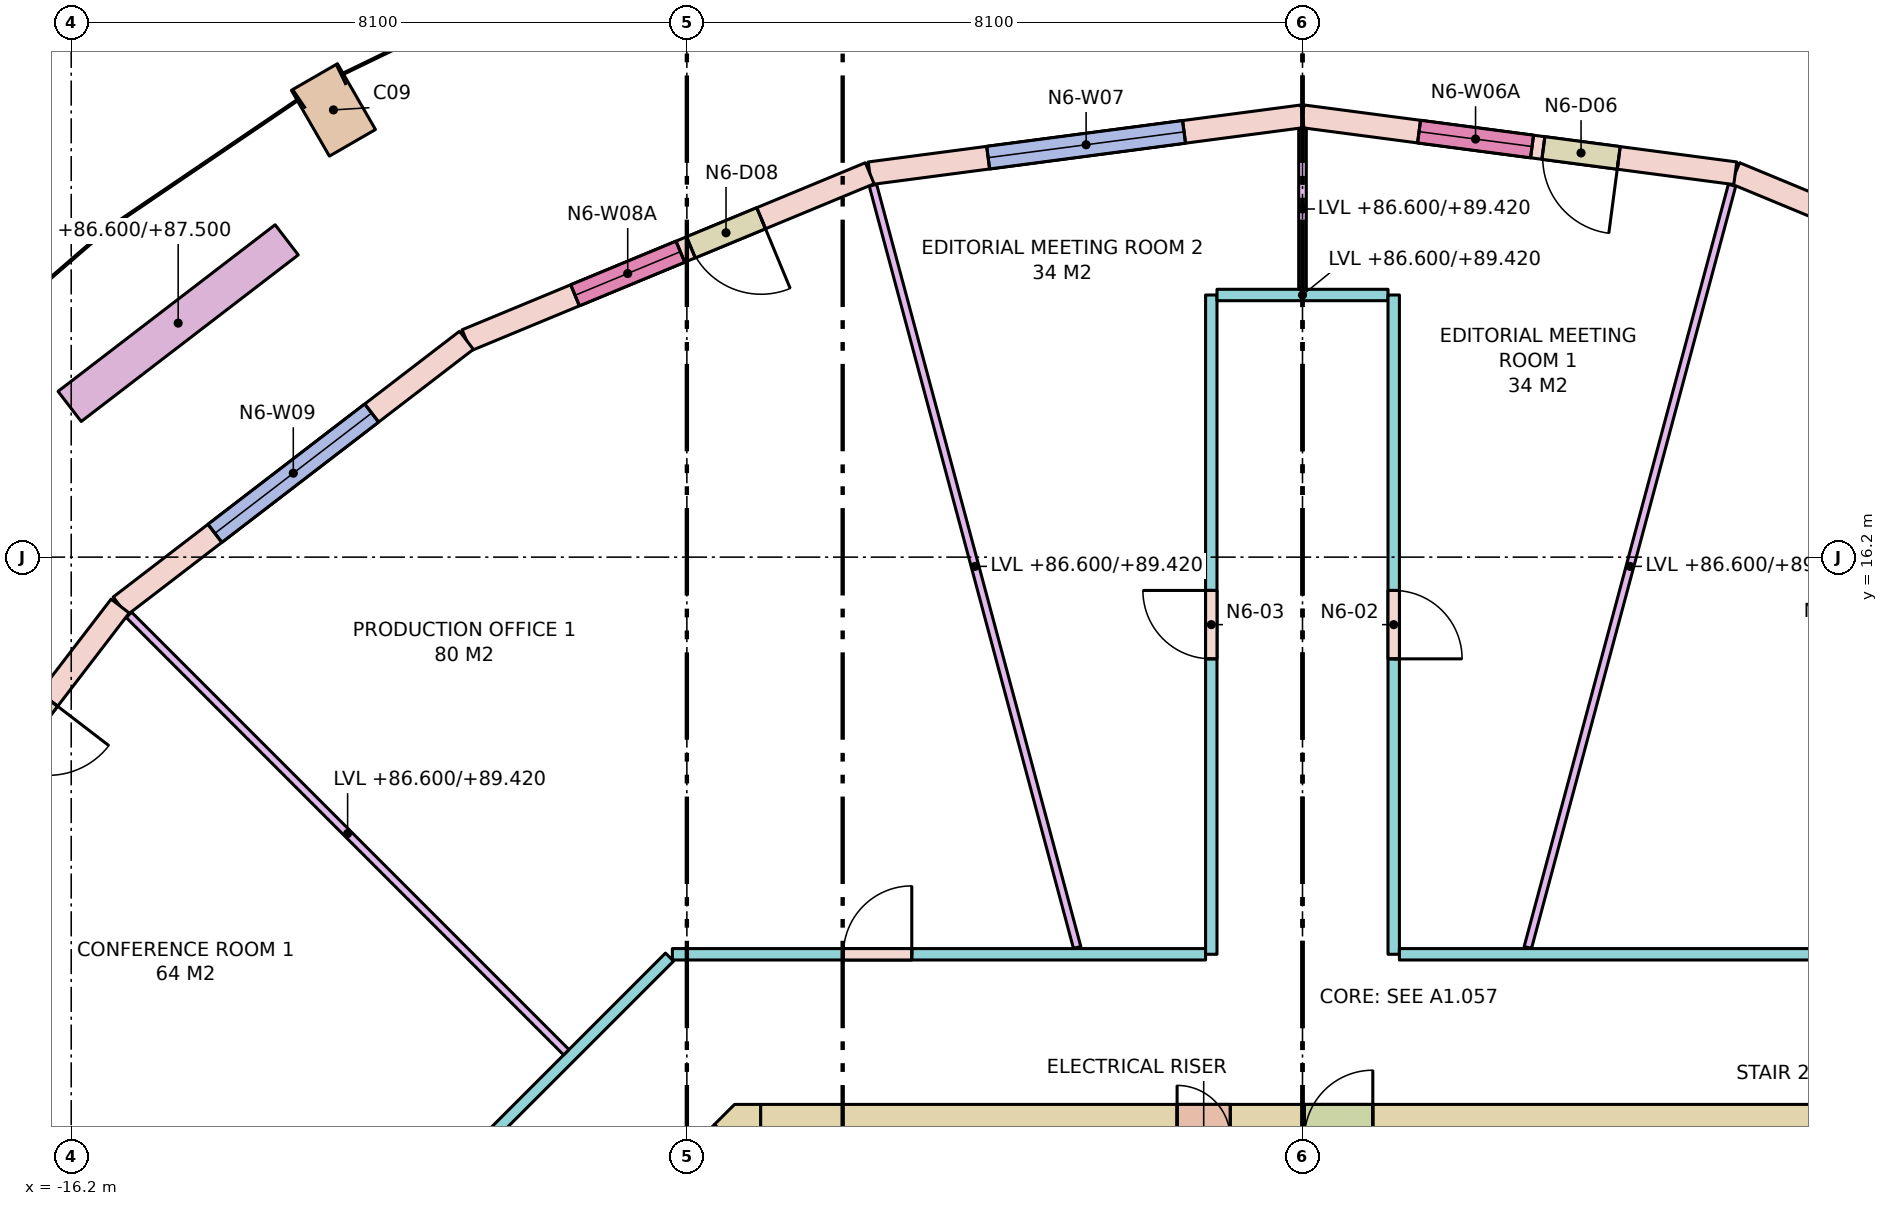
"""IFC4 building model, lengths in metres.
Left out: names, types, materials, properties, quantities, classifications, styles, units other than length and angle.
Written with IfcOpenShell. Run it as: python <this file> out.ifc"""

import sys

from ifc_helpers import new_model, si_unit, direction, frame, frame_2d, origin, origin_2d, place, context, subcontext, project, spatial, polyline, rectangle, outline, extrude, element, fill, save


model = new_model("IFC4")
c1 = context("Model", 3, precision=1e-05, world=origin(), true_north=direction((0.0, 1.0)))
c2 = subcontext(c1, "Body", "Model", "MODEL_VIEW")
j1 = project(units=[si_unit("LENGTHUNIT", "METRE"), si_unit("PLANEANGLEUNIT", "RADIAN")], contexts=[c1])
p1 = place(None, origin())
s1 = spatial("IfcSite", under=j1, at=p1, CompositionType="ELEMENT")
p2 = place(p1, origin())
s2 = spatial("IfcBuilding", under=s1, at=p2, CompositionType="ELEMENT")
p3 = place(p2, frame((0.0, 0.0, 86.6)))
s3 = spatial("IfcBuildingStorey", under=s2, at=p3, CompositionType="ELEMENT", Elevation=86.6)
p4 = place(p3, frame((-12.75, 22.084, 0.0), z_axis=(0.0, 0.0, 1.0), x_axis=(-0.866025403784, -0.5, 0.0)))
e1 = element("IfcColumn", 1, at=p4, inside=s3, PredefinedType="COLUMN", context=c2, shape_type="SweptSolid", body=[
    extrude(rectangle(XDim=0.7, YDim=1.0, at=origin_2d()), origin(), (0.0, 0.0, 1.0), 4.0),
])
p5 = place(p3, frame((-7.13, 8.55, -0.28), z_axis=(0.0, 0.0, 1.0), x_axis=(1.0, 0.0, 0.0)))
e2 = element("IfcWall", 2, at=p5, inside=s3, PredefinedType="SHEAR", context=c2, shape_type="SweptSolid", body=[
    extrude(rectangle(XDim=14.26, YDim=0.9, at=frame_2d((7.13, 0.0))), origin(), (0.0, 0.0, 1.0), 4.0),
])
p6 = place(p5, frame((5.48, 0.0, 0.28)))
e3 = element("IfcOpeningElement", 3, at=p6, cuts=e2, PredefinedType="OPENING", context=c2, shape_type="SweptSolid", body=[
    extrude(rectangle(XDim=0.7, YDim=2.1, at=frame_2d((0.35, 1.05))), frame((0.0, 0.46, 0.0), z_axis=(0.0, -1.0, 0.0), x_axis=(1.0, 0.0, 0.0)), (0.0, 0.0, 1.0), 0.92),
])
p7 = place(p5, frame((7.155, 0.0, 0.28)))
e4 = element("IfcOpeningElement", 4, at=p7, cuts=e2, PredefinedType="OPENING", context=c2, shape_type="SweptSolid", body=[
    extrude(rectangle(XDim=0.9, YDim=2.1, at=frame_2d((0.45, 1.05))), frame((0.0, 0.46, 0.0), z_axis=(0.0, -1.0, 0.0), x_axis=(1.0, 0.0, 0.0)), (0.0, 0.0, 1.0), 0.92),
])
p8 = place(p3, frame((-10.418, 5.418, -0.28), z_axis=(0.0, 0.0, 1.0), x_axis=(0.707106781187, 0.707106781187, 0.0)))
e5 = element("IfcWall", 5, at=p8, inside=s3, PredefinedType="SHEAR", context=c2, shape_type="SweptSolid", body=[
    extrude(rectangle(XDim=4.243, YDim=0.9, at=frame_2d((2.121, 0.0))), origin(), (0.0, 0.0, 1.0), 4.0),
])
p9 = place(p8, frame((0.65, 0.0, 0.28)))
e6 = element("IfcOpeningElement", 6, at=p9, cuts=e5, PredefinedType="OPENING", context=c2, shape_type="SweptSolid", body=[
    extrude(rectangle(XDim=1.2, YDim=2.1, at=frame_2d((0.6, 1.05))), frame((0.0, 0.46, 0.0), z_axis=(0.0, -1.0, 0.0), x_axis=(1.0, 0.0, 0.0)), (0.0, 0.0, 1.0), 0.92),
])
p10 = place(p3, frame((0.0, 0.0, -0.28)))
e7 = element("IfcWall", 7, at=p10, inside=s3, PredefinedType="SHEAR", context=c2, shape_type="SweptSolid", body=[
    extrude(outline(polyline([(-7.473, 9.0), (-7.13, 9.0), (-7.13, 8.13), (-7.736, 8.736), (-7.473, 9.0)])), origin(), (0.0, 0.0, 1.0), 4.0),
])
p11 = place(p3, frame((11.0, 19.052, 0.0), z_axis=(0.0, 0.0, 1.0), x_axis=(-0.923866055759, 0.382715966503, 0.0)))
e8 = element("IfcWall", 8, at=p11, inside=s3, PredefinedType="STANDARD", context=c2, shape_type="SweptSolid", body=[
    extrude(rectangle(XDim=5.743, YDim=0.3, at=frame_2d((2.872, 0.0))), origin(), (0.0, 0.0, 1.0), 3.72),
])
p12 = place(p11, frame((1.572, 0.0, 0.8)))
e9 = element("IfcOpeningElement", 9, at=p12, cuts=e8, PredefinedType="OPENING", context=c2, shape_type="SweptSolid", body=[
    extrude(rectangle(XDim=2.6, YDim=2.7, at=frame_2d((1.3, 1.35))), frame((0.0, 0.16, 0.0), z_axis=(0.0, -1.0, 0.0), x_axis=(1.0, 0.0, 0.0)), (0.0, 0.0, 1.0), 0.32),
])
p13 = place(p3, frame((5.694, 21.25, 0.0), z_axis=(0.0, 0.0, 1.0), x_axis=(-0.991447783331, 0.130503995834, 0.0)))
e10 = element("IfcWall", 10, at=p13, inside=s3, PredefinedType="STANDARD", context=c2, shape_type="SweptSolid", body=[
    extrude(rectangle(XDim=5.743, YDim=0.3, at=frame_2d((2.872, 0.0))), origin(), (0.0, 0.0, 1.0), 3.72),
])
p14 = place(p13, frame((1.547, 0.0, 0.0)))
e11 = element("IfcOpeningElement", 11, at=p14, cuts=e10, PredefinedType="OPENING", context=c2, shape_type="SweptSolid", body=[
    extrude(rectangle(XDim=1.0, YDim=2.4, at=frame_2d((0.5, 1.2))), frame((0.0, 0.16, 0.0), z_axis=(0.0, -1.0, 0.0), x_axis=(1.0, 0.0, 0.0)), (0.0, 0.0, 1.0), 0.32),
])
p15 = place(p13, frame((2.697, 0.0, 0.8)))
e12 = element("IfcOpeningElement", 12, at=p15, cuts=e10, PredefinedType="OPENING", context=c2, shape_type="SweptSolid", body=[
    extrude(rectangle(XDim=1.5, YDim=2.7, at=frame_2d((0.75, 1.35))), frame((0.0, 0.16, 0.0), z_axis=(0.0, -1.0, 0.0), x_axis=(1.0, 0.0, 0.0)), (0.0, 0.0, 1.0), 0.32),
])
p16 = place(p3, frame((0.0, 22.0, 0.0), z_axis=(0.0, 0.0, 1.0), x_axis=(-0.991447783331, -0.130503995834, 0.0)))
e13 = element("IfcWall", 13, at=p16, inside=s3, PredefinedType="STANDARD", context=c2, shape_type="SweptSolid", body=[
    extrude(rectangle(XDim=5.743, YDim=0.3, at=frame_2d((2.872, 0.0))), origin(), (0.0, 0.0, 1.0), 3.72),
])
p17 = place(p16, frame((1.572, 0.0, 0.8)))
e14 = element("IfcOpeningElement", 14, at=p17, cuts=e13, PredefinedType="OPENING", context=c2, shape_type="SweptSolid", body=[
    extrude(rectangle(XDim=2.6, YDim=2.7, at=frame_2d((1.3, 1.35))), frame((0.0, 0.16, 0.0), z_axis=(0.0, -1.0, 0.0), x_axis=(1.0, 0.0, 0.0)), (0.0, 0.0, 1.0), 0.32),
])
p18 = place(p3, frame((-5.694, 21.25, 0.0), z_axis=(0.0, 0.0, 1.0), x_axis=(-0.923866055759, -0.382715966503, 0.0)))
e15 = element("IfcWall", 15, at=p18, inside=s3, PredefinedType="STANDARD", context=c2, shape_type="SweptSolid", body=[
    extrude(rectangle(XDim=5.743, YDim=0.3, at=frame_2d((2.872, 0.0))), origin(), (0.0, 0.0, 1.0), 3.72),
])
p19 = place(p18, frame((1.547, 0.0, 0.0)))
e16 = element("IfcOpeningElement", 16, at=p19, cuts=e15, PredefinedType="OPENING", context=c2, shape_type="SweptSolid", body=[
    extrude(rectangle(XDim=1.0, YDim=2.4, at=frame_2d((0.5, 1.2))), frame((0.0, 0.16, 0.0), z_axis=(0.0, -1.0, 0.0), x_axis=(1.0, 0.0, 0.0)), (0.0, 0.0, 1.0), 0.32),
])
p20 = place(p18, frame((2.697, 0.0, 0.8)))
e17 = element("IfcOpeningElement", 17, at=p20, cuts=e15, PredefinedType="OPENING", context=c2, shape_type="SweptSolid", body=[
    extrude(rectangle(XDim=1.5, YDim=2.7, at=frame_2d((0.75, 1.35))), frame((0.0, 0.16, 0.0), z_axis=(0.0, -1.0, 0.0), x_axis=(1.0, 0.0, 0.0)), (0.0, 0.0, 1.0), 0.32),
])
p21 = place(p3, frame((-11.0, 19.052, 0.0), z_axis=(0.0, 0.0, 1.0), x_axis=(-0.793366142647, -0.608744744291, 0.0)))
e18 = element("IfcWall", 18, at=p21, inside=s3, PredefinedType="STANDARD", context=c2, shape_type="SweptSolid", body=[
    extrude(rectangle(XDim=5.743, YDim=0.3, at=frame_2d((2.872, 0.0))), origin(), (0.0, 0.0, 1.0), 3.72),
])
p22 = place(p21, frame((1.572, 0.0, 0.8)))
e19 = element("IfcOpeningElement", 19, at=p22, cuts=e18, PredefinedType="OPENING", context=c2, shape_type="SweptSolid", body=[
    extrude(rectangle(XDim=2.6, YDim=2.7, at=frame_2d((1.3, 1.35))), frame((0.0, 0.16, 0.0), z_axis=(0.0, -1.0, 0.0), x_axis=(1.0, 0.0, 0.0)), (0.0, 0.0, 1.0), 0.32),
])
p23 = place(p3, frame((-15.556, 15.556, 0.0), z_axis=(0.0, 0.0, 1.0), x_axis=(-0.608744744291, -0.793366142647, 0.0)))
e20 = element("IfcWall", 20, at=p23, inside=s3, PredefinedType="STANDARD", context=c2, shape_type="SweptSolid", body=[
    extrude(rectangle(XDim=5.743, YDim=0.3, at=frame_2d((2.872, 0.0))), origin(), (0.0, 0.0, 1.0), 3.72),
])
p24 = place(p23, frame((1.547, 0.0, 0.0)))
e21 = element("IfcOpeningElement", 21, at=p24, cuts=e20, PredefinedType="OPENING", context=c2, shape_type="SweptSolid", body=[
    extrude(rectangle(XDim=1.0, YDim=2.4, at=frame_2d((0.5, 1.2))), frame((0.0, 0.16, 0.0), z_axis=(0.0, -1.0, 0.0), x_axis=(1.0, 0.0, 0.0)), (0.0, 0.0, 1.0), 0.32),
])
p25 = place(p23, frame((2.697, 0.0, 0.8)))
e22 = element("IfcOpeningElement", 22, at=p25, cuts=e20, PredefinedType="OPENING", context=c2, shape_type="SweptSolid", body=[
    extrude(rectangle(XDim=1.5, YDim=2.7, at=frame_2d((0.75, 1.35))), frame((0.0, 0.16, 0.0), z_axis=(0.0, -1.0, 0.0), x_axis=(1.0, 0.0, 0.0)), (0.0, 0.0, 1.0), 0.32),
])
p26 = place(p3, frame((-13.365, 20.374, 0.0), z_axis=(0.0, 0.0, 1.0), x_axis=(-0.793326845617, -0.608795955984, 0.0)))
e23 = element("IfcWall", 23, at=p26, inside=s3, PredefinedType="PARAPET", context=c2, shape_type="SweptSolid", body=[
    extrude(rectangle(XDim=3.6, YDim=0.5, at=frame_2d((1.8, 0.0))), origin(), (0.0, 0.0, 1.0), 0.9),
])
p27 = place(p3, frame((-12.975, 6.291, 0.0), z_axis=(0.0, 0.0, 1.0), x_axis=(0.707125355289, 0.707088206597, 0.0)))
e24 = element("IfcWall", 24, at=p27, inside=s3, PredefinedType="PARTITIONING", context=c2, shape_type="SweptSolid", body=[
    extrude(rectangle(XDim=6.572, YDim=0.15, at=frame_2d((3.286, 0.0))), origin(), (0.0, 0.0, 1.0), 2.82),
])
p28 = place(p3, frame((-8.291, 10.975, 0.0), z_axis=(0.0, 0.0, 1.0), x_axis=(1.0, 0.0, 0.0)))
e25 = element("IfcWall", 25, at=p28, inside=s3, PredefinedType="PARTITIONING", context=c2, shape_type="SweptSolid", body=[
    extrude(rectangle(XDim=7.016, YDim=0.15, at=frame_2d((3.508, 0.0))), origin(), (0.0, 0.0, 1.0), 2.82),
])
p29 = place(p28, frame((2.25, 0.0, 0.0)))
e26 = element("IfcOpeningElement", 26, at=p29, cuts=e25, PredefinedType="OPENING", context=c2, shape_type="SweptSolid", body=[
    extrude(rectangle(XDim=0.9, YDim=2.1, at=frame_2d((0.45, 1.05))), frame((0.0, 0.085, 0.0), z_axis=(0.0, -1.0, 0.0), x_axis=(1.0, 0.0, 0.0)), (0.0, 0.0, 1.0), 0.17),
])
p30 = place(p3, frame((-1.2, 10.975, 0.0), z_axis=(0.0, 0.0, 1.0), x_axis=(0.0, 1.0, 0.0)))
e27 = element("IfcWall", 27, at=p30, inside=s3, PredefinedType="PARTITIONING", context=c2, shape_type="SweptSolid", body=[
    extrude(rectangle(XDim=8.674, YDim=0.15, at=frame_2d((4.337, 0.0))), origin(), (0.0, 0.0, 1.0), 3.72),
])
p31 = place(p30, frame((3.887, 0.0, 0.0)))
e28 = element("IfcOpeningElement", 28, at=p31, cuts=e27, PredefinedType="OPENING", context=c2, shape_type="SweptSolid", body=[
    extrude(rectangle(XDim=0.9, YDim=2.1, at=frame_2d((0.45, 1.05))), frame((0.0, 0.085, 0.0), z_axis=(0.0, -1.0, 0.0), x_axis=(1.0, 0.0, 0.0)), (0.0, 0.0, 1.0), 0.17),
])
p32 = place(p3, frame((-1.125, 19.649, 0.0), z_axis=(0.0, 0.0, 1.0), x_axis=(1.0, 0.0, 0.0)))
e29 = element("IfcWall", 29, at=p32, inside=s3, PredefinedType="PARTITIONING", context=c2, shape_type="SweptSolid", body=[
    extrude(rectangle(XDim=2.25, YDim=0.15, at=frame_2d((1.125, 0.0))), origin(), (0.0, 0.0, 1.0), 2.82),
])
p33 = place(p3, frame((1.2, 19.649, 0.0), z_axis=(0.0, 0.0, 1.0), x_axis=(0.0, -1.0, 0.0)))
e30 = element("IfcWall", 30, at=p33, inside=s3, PredefinedType="PARTITIONING", context=c2, shape_type="SweptSolid", body=[
    extrude(rectangle(XDim=8.674, YDim=0.15, at=frame_2d((4.337, 0.0))), origin(), (0.0, 0.0, 1.0), 3.72),
])
p34 = place(p33, frame((3.887, 0.0, 0.0)))
e31 = element("IfcOpeningElement", 31, at=p34, cuts=e30, PredefinedType="OPENING", context=c2, shape_type="SweptSolid", body=[
    extrude(rectangle(XDim=0.9, YDim=2.1, at=frame_2d((0.45, 1.05))), frame((0.0, 0.085, 0.0), z_axis=(0.0, -1.0, 0.0), x_axis=(1.0, 0.0, 0.0)), (0.0, 0.0, 1.0), 0.17),
])
p35 = place(p3, frame((1.275, 10.975, 0.0), z_axis=(0.0, 0.0, 1.0), x_axis=(1.0, 0.0, 0.0)))
e32 = element("IfcWall", 32, at=p35, inside=s3, PredefinedType="PARTITIONING", context=c2, shape_type="SweptSolid", body=[
    extrude(rectangle(XDim=7.016, YDim=0.15, at=frame_2d((3.508, 0.0))), origin(), (0.0, 0.0, 1.0), 2.82),
])
p36 = place(p3, frame((2.965, 11.064, 0.0), z_axis=(0.0, 0.0, 1.0), x_axis=(0.258834819477, 0.96592159942, 0.0)))
e33 = element("IfcWall", 33, at=p36, inside=s3, PredefinedType="PARTITIONING", context=c2, shape_type="SweptSolid", body=[
    extrude(rectangle(XDim=10.382, YDim=0.1, at=frame_2d((5.191, 0.0))), origin(), (0.0, 0.0, 1.0), 2.82),
])
p37 = place(p3, frame((0.0, 19.724, 0.0), z_axis=(0.0, 0.0, 1.0), x_axis=(0.0, 1.0, 0.0)))
e34 = element("IfcWall", 34, at=p37, inside=s3, PredefinedType="PARTITIONING", context=c2, shape_type="SweptSolid", body=[
    extrude(rectangle(XDim=2.113, YDim=0.1, at=frame_2d((1.057, 0.0))), origin(), (0.0, 0.0, 1.0), 2.82),
])
p38 = place(p3, frame((-2.965, 11.064, 0.0), z_axis=(0.0, 0.0, 1.0), x_axis=(-0.258834819477, 0.96592159942, 0.0)))
e35 = element("IfcWall", 35, at=p38, inside=s3, PredefinedType="PARTITIONING", context=c2, shape_type="SweptSolid", body=[
    extrude(rectangle(XDim=10.382, YDim=0.1, at=frame_2d((5.191, 0.0))), origin(), (0.0, 0.0, 1.0), 2.82),
])
p39 = place(p3, frame((-9.686, 9.686, 0.0), z_axis=(0.0, 0.0, 1.0), x_axis=(-0.707106781187, 0.707106781187, 0.0)))
e36 = element("IfcWall", 36, at=p39, inside=s3, PredefinedType="PARTITIONING", context=c2, shape_type="SweptSolid", body=[
    extrude(rectangle(XDim=8.139, YDim=0.1, at=frame_2d((4.069, 0.0))), origin(), (0.0, 0.0, 1.0), 2.82),
])
p40 = place(p14, origin())
e37 = element("IfcDoor", 37, at=p40, inside=s3, OperationType="SINGLE_SWING_LEFT", PredefinedType="DOOR", context=c2, shape_type="SweptSolid", body=[
    extrude(rectangle(XDim=1.0, YDim=2.4, at=frame_2d((0.5, 1.2))), frame((0.0, 0.025, 0.0), z_axis=(0.0, -1.0, 0.0), x_axis=(1.0, 0.0, 0.0)), (0.0, 0.0, 1.0), 0.05),
])
fill(e11, e37)
p41 = place(p15, origin())
e38 = element("IfcWindow", 38, at=p41, inside=s3, PartitioningType="SINGLE_PANEL", PredefinedType="WINDOW", context=c2, shape_type="SweptSolid", body=[
    extrude(rectangle(XDim=1.5, YDim=2.7, at=frame_2d((0.75, 1.35))), frame((0.0, 0.03, 0.0), z_axis=(0.0, -1.0, 0.0), x_axis=(1.0, 0.0, 0.0)), (0.0, 0.0, 1.0), 0.06),
])
fill(e12, e38)
p42 = place(p17, origin())
e39 = element("IfcWindow", 39, at=p42, inside=s3, PartitioningType="SINGLE_PANEL", PredefinedType="WINDOW", context=c2, shape_type="SweptSolid", body=[
    extrude(rectangle(XDim=2.6, YDim=2.7, at=frame_2d((1.3, 1.35))), frame((0.0, 0.03, 0.0), z_axis=(0.0, -1.0, 0.0), x_axis=(1.0, 0.0, 0.0)), (0.0, 0.0, 1.0), 0.06),
])
fill(e14, e39)
p43 = place(p19, origin())
e40 = element("IfcDoor", 40, at=p43, inside=s3, OperationType="SINGLE_SWING_LEFT", PredefinedType="DOOR", context=c2, shape_type="SweptSolid", body=[
    extrude(rectangle(XDim=1.0, YDim=2.4, at=frame_2d((0.5, 1.2))), frame((0.0, 0.025, 0.0), z_axis=(0.0, -1.0, 0.0), x_axis=(1.0, 0.0, 0.0)), (0.0, 0.0, 1.0), 0.05),
])
fill(e16, e40)
p44 = place(p20, origin())
e41 = element("IfcWindow", 41, at=p44, inside=s3, PartitioningType="SINGLE_PANEL", PredefinedType="WINDOW", context=c2, shape_type="SweptSolid", body=[
    extrude(rectangle(XDim=1.5, YDim=2.7, at=frame_2d((0.75, 1.35))), frame((0.0, 0.03, 0.0), z_axis=(0.0, -1.0, 0.0), x_axis=(1.0, 0.0, 0.0)), (0.0, 0.0, 1.0), 0.06),
])
fill(e17, e41)
p45 = place(p22, origin())
e42 = element("IfcWindow", 42, at=p45, inside=s3, PartitioningType="SINGLE_PANEL", PredefinedType="WINDOW", context=c2, shape_type="SweptSolid", body=[
    extrude(rectangle(XDim=2.6, YDim=2.7, at=frame_2d((1.3, 1.35))), frame((0.0, 0.03, 0.0), z_axis=(0.0, -1.0, 0.0), x_axis=(1.0, 0.0, 0.0)), (0.0, 0.0, 1.0), 0.06),
])
fill(e19, e42)
p46 = place(p34, origin())
e43 = element("IfcDoor", 43, at=p46, inside=s3, OperationType="SINGLE_SWING_RIGHT", PredefinedType="DOOR", context=c2, shape_type="SweptSolid", body=[
    extrude(rectangle(XDim=0.9, YDim=2.1, at=frame_2d((0.45, 1.05))), frame((0.0, 0.025, 0.0), z_axis=(0.0, -1.0, 0.0), x_axis=(1.0, 0.0, 0.0)), (0.0, 0.0, 1.0), 0.05),
])
fill(e31, e43)
p47 = place(p31, origin())
e44 = element("IfcDoor", 44, at=p47, inside=s3, OperationType="SINGLE_SWING_RIGHT", PredefinedType="DOOR", context=c2, shape_type="SweptSolid", body=[
    extrude(rectangle(XDim=0.9, YDim=2.1, at=frame_2d((0.45, 1.05))), frame((0.0, 0.025, 0.0), z_axis=(0.0, -1.0, 0.0), x_axis=(1.0, 0.0, 0.0)), (0.0, 0.0, 1.0), 0.05),
])
fill(e28, e44)
p48 = place(p29, origin())
e45 = element("IfcDoor", 45, at=p48, inside=s3, OperationType="SINGLE_SWING_RIGHT", PredefinedType="DOOR", context=c2, shape_type="SweptSolid", body=[
    extrude(rectangle(XDim=0.9, YDim=2.1, at=frame_2d((0.45, 1.05))), frame((0.0, 0.025, 0.0), z_axis=(0.0, -1.0, 0.0), x_axis=(1.0, 0.0, 0.0)), (0.0, 0.0, 1.0), 0.05),
])
fill(e26, e45)
save(model, sys.argv[1])
